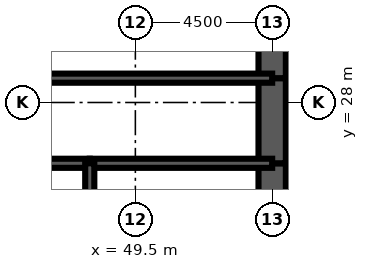
"""IFC4 building model, lengths in metres.
Left out: names, types, materials, properties, quantities, classifications, styles, units other than length and angle.
Written with IfcOpenShell. Run it as: python <this file> out.ifc"""

import sys

from ifc_helpers import new_model, si_unit, direction, frame, frame_2d, origin, place, context, subcontext, project, spatial, rectangle, extrude, element, fill, save


model = new_model("IFC4")
c1 = context("Model", 3, precision=1e-05, world=origin(), true_north=direction((0.0, 1.0)))
c2 = subcontext(c1, "Body", "Model", "MODEL_VIEW")
j1 = project(units=[si_unit("LENGTHUNIT", "METRE"), si_unit("PLANEANGLEUNIT", "RADIAN")], contexts=[c1])
p1 = place(None, origin())
s1 = spatial("IfcSite", under=j1, at=p1, CompositionType="ELEMENT")
p2 = place(p1, origin())
s2 = spatial("IfcBuilding", under=s1, at=p2, CompositionType="ELEMENT")
p3 = place(p2, frame((0.0, 0.0, 36.5)))
s3 = spatial("IfcBuildingStorey", under=s2, at=p3, CompositionType="ELEMENT", Elevation=36.5)
p4 = place(p3, frame((54.0, 22.0, 0.0), z_axis=(0.0, 0.0, 1.0), x_axis=(0.0, 1.0, 0.0)))
e1 = element("IfcWall", 1, at=p4, inside=s3, PredefinedType="SHEAR", context=c2, shape_type="SweptSolid", body=[
    extrude(rectangle(XDim=4.0, YDim=0.9, at=frame_2d((2.0, 0.0))), origin(), (0.0, 0.0, 1.0), 4.5),
])
p5 = place(p3, frame((54.0, 26.0, 0.0), z_axis=(0.0, 0.0, 1.0), x_axis=(0.0, 1.0, 0.0)))
e2 = element("IfcWall", 2, at=p5, inside=s3, PredefinedType="SHEAR", context=c2, shape_type="SweptSolid", body=[
    extrude(rectangle(XDim=2.8, YDim=0.9, at=frame_2d((1.4, 0.0))), origin(), (0.0, 0.0, 1.0), 4.5),
])
p6 = place(p5, frame((0.6, 0.0, 0.0)))
e3 = element("IfcOpeningElement", 3, at=p6, cuts=e2, PredefinedType="OPENING", context=c2, shape_type="SweptSolid", body=[
    extrude(rectangle(XDim=1.8, YDim=2.1, at=frame_2d((0.9, 1.05))), frame((0.0, 0.46, 0.0), z_axis=(0.0, -1.0, 0.0), x_axis=(1.0, 0.0, 0.0)), (0.0, 0.0, 1.0), 0.92),
])
p7 = place(p3, frame((54.0, 28.8, 0.0), z_axis=(0.0, 0.0, 1.0), x_axis=(0.0, 1.0, 0.0)))
e4 = element("IfcWall", 4, at=p7, inside=s3, PredefinedType="SHEAR", context=c2, shape_type="SweptSolid", body=[
    extrude(rectangle(XDim=3.2, YDim=0.9, at=frame_2d((1.6, 0.0))), origin(), (0.0, 0.0, 1.0), 4.5),
])
p8 = place(p3, frame((45.0, 28.8, 0.0), z_axis=(0.0, 0.0, 1.0), x_axis=(1.0, 0.0, 0.0)))
e5 = element("IfcWall", 5, at=p8, inside=s3, PredefinedType="SOLIDWALL", context=c2, shape_type="SweptSolid", body=[
    extrude(rectangle(XDim=9.0, YDim=0.3, at=frame_2d((4.5, 0.0))), origin(), (0.0, 0.0, 1.0), 4.5),
])
p9 = place(p8, frame((7.35, 0.0, 0.0)))
e6 = element("IfcOpeningElement", 6, at=p9, cuts=e5, PredefinedType="OPENING", context=c2, shape_type="SweptSolid", body=[
    extrude(rectangle(XDim=1.0, YDim=2.1, at=frame_2d((0.5, 1.05))), frame((0.0, 0.16, 0.0), z_axis=(0.0, -1.0, 0.0), x_axis=(1.0, 0.0, 0.0)), (0.0, 0.0, 1.0), 0.32),
])
p10 = place(p3, frame((45.0, 26.0, 0.0), z_axis=(0.0, 0.0, 1.0), x_axis=(1.0, 0.0, 0.0)))
e7 = element("IfcWall", 7, at=p10, inside=s3, PredefinedType="SOLIDWALL", context=c2, shape_type="SweptSolid", body=[
    extrude(rectangle(XDim=3.0, YDim=0.3, at=frame_2d((1.5, 0.0))), origin(), (0.0, 0.0, 1.0), 4.5),
])
p11 = place(p3, frame((48.0, 26.0, 0.0), z_axis=(0.0, 0.0, 1.0), x_axis=(1.0, 0.0, 0.0)))
e8 = element("IfcWall", 8, at=p11, inside=s3, PredefinedType="SOLIDWALL", context=c2, shape_type="SweptSolid", body=[
    extrude(rectangle(XDim=6.0, YDim=0.3, at=frame_2d((3.0, 0.0))), origin(), (0.0, 0.0, 1.0), 4.5),
])
p12 = place(p3, frame((48.0, 22.0, 0.0), z_axis=(0.0, 0.0, 1.0), x_axis=(0.0, 1.0, 0.0)))
e9 = element("IfcWall", 9, at=p12, inside=s3, PredefinedType="SOLIDWALL", context=c2, shape_type="SweptSolid", body=[
    extrude(rectangle(XDim=4.0, YDim=0.3, at=frame_2d((2.0, 0.0))), origin(), (0.0, 0.0, 1.0), 4.5),
])
p13 = place(p3, frame((51.675, 22.15, 0.0), z_axis=(0.0, 0.0, 1.0), x_axis=(0.0, 1.0, 0.0)))
e10 = element("IfcWall", 10, at=p13, inside=s3, PredefinedType="PARTITIONING", context=c2, shape_type="SweptSolid", body=[
    extrude(rectangle(XDim=3.7, YDim=0.15, at=frame_2d((1.85, 0.0))), origin(), (0.0, 0.0, 1.0), 3.0),
])
p14 = place(p3, frame((47.7, 26.15, 0.0), z_axis=(0.0, 0.0, 1.0), x_axis=(0.0, 1.0, 0.0)))
e11 = element("IfcWall", 11, at=p14, inside=s3, PredefinedType="PARTITIONING", context=c2, shape_type="SweptSolid", body=[
    extrude(rectangle(XDim=2.5, YDim=0.15, at=frame_2d((1.25, 0.0))), origin(), (0.0, 0.0, 1.0), 3.0),
])
p15 = place(p14, frame((1.15, 0.0, 0.0)))
e12 = element("IfcOpeningElement", 12, at=p15, cuts=e11, PredefinedType="OPENING", context=c2, shape_type="SweptSolid", body=[
    extrude(rectangle(XDim=1.0, YDim=2.1, at=frame_2d((0.5, 1.05))), frame((0.0, 0.085, 0.0), z_axis=(0.0, -1.0, 0.0), x_axis=(1.0, 0.0, 0.0)), (0.0, 0.0, 1.0), 0.17),
])
p16 = place(p15, origin())
e13 = element("IfcDoor", 13, at=p16, inside=s3, OperationType="SINGLE_SWING_RIGHT", PredefinedType="DOOR", context=c2, shape_type="SweptSolid", body=[
    extrude(rectangle(XDim=1.0, YDim=2.1, at=frame_2d((0.5, 1.05))), frame((0.0, 0.025, 0.0), z_axis=(0.0, -1.0, 0.0), x_axis=(1.0, 0.0, 0.0)), (0.0, 0.0, 1.0), 0.05),
])
fill(e12, e13)
p17 = place(p9, origin())
e14 = element("IfcDoor", 14, at=p17, inside=s3, OperationType="SINGLE_SWING_RIGHT", PredefinedType="DOOR", context=c2, shape_type="SweptSolid", body=[
    extrude(rectangle(XDim=1.0, YDim=2.1, at=frame_2d((0.5, 1.05))), frame((0.0, 0.025, 0.0), z_axis=(0.0, -1.0, 0.0), x_axis=(1.0, 0.0, 0.0)), (0.0, 0.0, 1.0), 0.05),
])
fill(e6, e14)
p18 = place(p6, origin())
e15 = element("IfcDoor", 15, at=p18, inside=s3, OperationType="SINGLE_SWING_LEFT", PredefinedType="DOOR", context=c2, shape_type="SweptSolid", body=[
    extrude(rectangle(XDim=1.8, YDim=2.1, at=frame_2d((0.9, 1.05))), frame((0.0, 0.45, 0.0), z_axis=(0.0, -1.0, 0.0), x_axis=(1.0, 0.0, 0.0)), (0.0, 0.0, 1.0), 0.899),
])
fill(e3, e15)
save(model, sys.argv[1])
